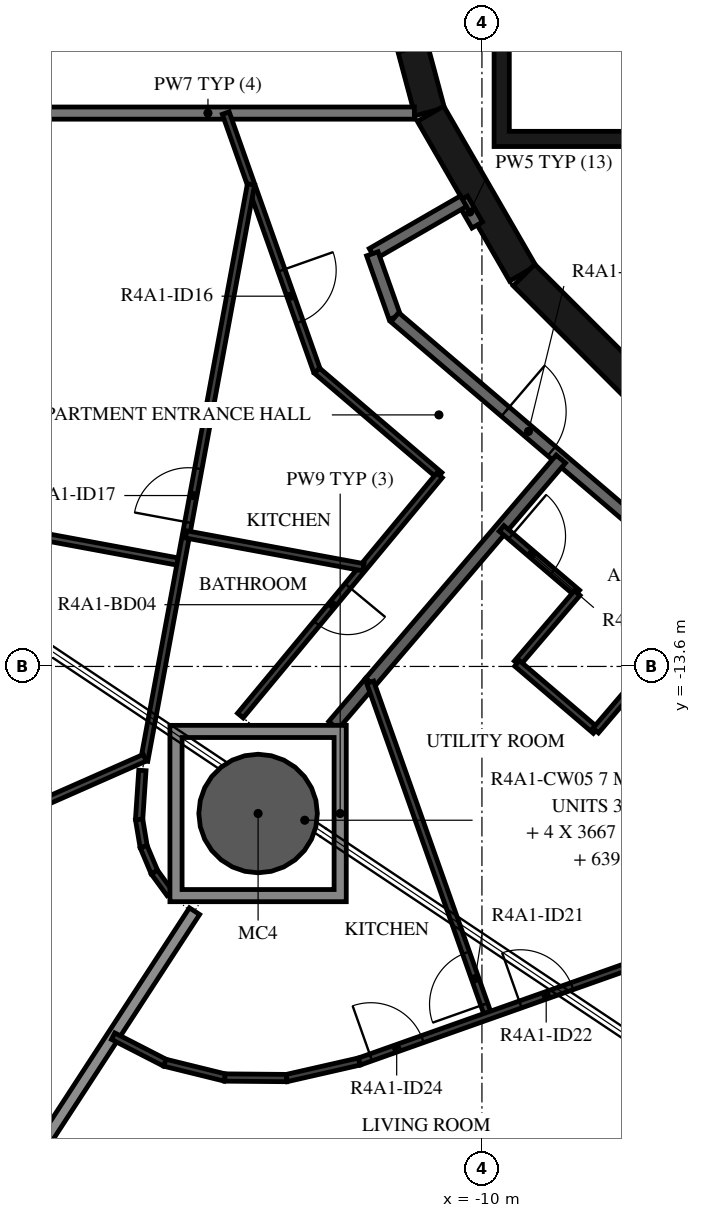
"""IFC4 building model, lengths in metres.
Left out: names, types, materials, properties, quantities, classifications, styles, units other than length and angle.
Written with IfcOpenShell. Run it as: python <this file> out.ifc"""

import sys

from ifc_helpers import new_model, si_unit, direction, frame, frame_2d, origin, origin_2d, place, context, subcontext, project, spatial, polyline, rectangle, hollow_circle, outline, extrude, element, fill, save


model = new_model("IFC4")
c1 = context("Model", 3, precision=1e-05, world=origin(), true_north=direction((0.0, 1.0)))
c2 = subcontext(c1, "Body", "Model", "MODEL_VIEW")
j1 = project(units=[si_unit("LENGTHUNIT", "METRE"), si_unit("PLANEANGLEUNIT", "RADIAN")], contexts=[c1])
p1 = place(None, origin())
s1 = spatial("IfcSite", under=j1, at=p1, CompositionType="ELEMENT")
p2 = place(p1, origin())
s2 = spatial("IfcBuilding", under=s1, at=p2, CompositionType="ELEMENT")
p3 = place(p2, frame((0.0, 0.0, 155.2)))
s3 = spatial("IfcBuildingStorey", under=s2, at=p3, CompositionType="ELEMENT", Elevation=155.2)
p4 = place(p3, frame((-13.681, -16.019, -0.38), z_axis=(0.0, 0.0, 1.0), x_axis=(1.0, 0.0, 0.0)))
e1 = element("IfcColumn", 1, at=p4, inside=s3, PredefinedType="COLUMN", context=c2, shape_type="SweptSolid", body=[
    extrude(hollow_circle(Radius=0.975, WallThickness=0.045, at=origin_2d()), origin(), (0.0, 0.0, 1.0), 3.5),
])
p5 = place(p3, frame((-11.643, -1.55, 0.0), z_axis=(0.0, 0.0, 1.0), x_axis=(0.258734743916, -0.965948410781, 0.0)))
e2 = element("IfcWall", 2, at=p5, inside=s3, PredefinedType="SHEAR", context=c2, shape_type="SweptSolid", body=[
    extrude(rectangle(XDim=3.033, YDim=0.5, at=frame_2d((1.516, 0.0))), origin(), (0.0, 0.0, 1.0), 3.12),
])
p6 = place(p5, frame((1.066, 0.0, 0.0)))
e3 = element("IfcOpeningElement", 3, at=p6, cuts=e2, PredefinedType="OPENING", context=c2, shape_type="SweptSolid", body=[
    extrude(rectangle(XDim=0.9, YDim=2.1, at=frame_2d((0.45, 1.05))), frame((0.0, 0.26, 0.0), z_axis=(0.0, -1.0, 0.0), x_axis=(1.0, 0.0, 0.0)), (0.0, 0.0, 1.0), 0.52),
])
p7 = place(p3, frame((-10.845, -4.51, 0.0), z_axis=(0.0, 0.0, 1.0), x_axis=(0.500087131594, -0.865975092491, 0.0)))
e4 = element("IfcWall", 4, at=p7, inside=s3, PredefinedType="SHEAR", context=c2, shape_type="SweptSolid", body=[
    extrude(rectangle(XDim=3.033, YDim=0.5, at=frame_2d((1.516, 0.0))), origin(), (0.0, 0.0, 1.0), 3.12),
])
p8 = place(p3, frame((-9.308, -7.164, 0.0), z_axis=(0.0, 0.0, 1.0), x_axis=(0.707106781187, -0.707106781187, 0.0)))
e5 = element("IfcWall", 5, at=p8, inside=s3, PredefinedType="SHEAR", context=c2, shape_type="SweptSolid", body=[
    extrude(rectangle(XDim=3.032, YDim=0.5, at=frame_2d((1.516, 0.0))), origin(), (0.0, 0.0, 1.0), 3.12),
])
p9 = place(p3, origin())
e6 = element("IfcWall", 6, at=p9, inside=s3, PredefinedType="SHEAR", context=c2, shape_type="SweptSolid", body=[
    extrude(outline(polyline([(9.8, -5.05), (9.8, -4.8), (9.8, -1.9), (9.55, -1.9), (9.55, -4.8), (7.65, -4.8), (7.65, -1.9), (7.4, -1.9), (7.4, -4.8), (5.5, -4.8), (5.5, -1.9), (5.25, -1.9), (5.25, -4.8), (3.35, -4.8), (3.35, -1.9), (3.1, -1.9), (3.1, -4.8), (1.2, -4.8), (1.2, -1.9), (0.95, -1.9), (0.95, -4.8), (-0.95, -4.8), (-0.95, -1.9), (-1.2, -1.9), (-1.2, -4.8), (-3.1, -4.8), (-3.1, -1.9), (-3.35, -1.9), (-3.35, -4.8), (-5.25, -4.8), (-5.25, -1.9), (-5.5, -1.9), (-5.5, -4.8), (-7.4, -4.8), (-7.4, -1.9), (-7.65, -1.9), (-7.65, -4.8), (-9.55, -4.8), (-9.55, -1.9), (-9.8, -1.9), (-9.8, -4.8), (-9.8, -5.05), (9.8, -5.05)])), origin(), (0.0, 0.0, 1.0), 3.12),
])
p10 = place(p3, frame((-10.323, -5.914, 0.0), z_axis=(0.0, 0.0, 1.0), x_axis=(0.500137201729, -0.865946175837, 0.0)))
e7 = element("IfcWall", 7, at=p10, inside=s3, PredefinedType="STANDARD", context=c2, shape_type="SweptSolid", body=[
    extrude(rectangle(XDim=0.492, YDim=0.2, at=frame_2d((0.246, 0.0))), origin(), (0.0, 0.0, 1.0), 3.12),
])
p11 = place(p3, frame((-10.303, -5.949, 0.0), z_axis=(0.0, 0.0, 1.0), x_axis=(-0.866021168401, -0.500007335828, 0.0)))
e8 = element("IfcWall", 8, at=p11, inside=s3, PredefinedType="STANDARD", context=c2, shape_type="SweptSolid", body=[
    extrude(rectangle(XDim=1.731, YDim=0.2, at=frame_2d((0.865, 0.0))), origin(), (0.0, 0.0, 1.0), 3.12),
])
p12 = place(p3, frame((-11.802, -6.814, 0.0), z_axis=(0.0, 0.0, 1.0), x_axis=(0.333904297771, -0.942606980629, 0.0)))
e9 = element("IfcWall", 9, at=p12, inside=s3, PredefinedType="STANDARD", context=c2, shape_type="SweptSolid", body=[
    extrude(rectangle(XDim=1.107, YDim=0.2, at=frame_2d((0.553, 0.0))), origin(), (0.0, 0.0, 1.0), 3.12),
])
p13 = place(p3, frame((-11.433, -7.858, 0.0), z_axis=(0.0, 0.0, 1.0), x_axis=(0.760412154545, -0.649440801937, 0.0)))
e10 = element("IfcWall", 10, at=p13, inside=s3, PredefinedType="STANDARD", context=c2, shape_type="SweptSolid", body=[
    extrude(rectangle(XDim=7.181, YDim=0.2, at=frame_2d((3.59, 0.0))), origin(), (0.0, 0.0, 1.0), 3.12),
])
p14 = place(p13, frame((2.39, 0.0, 0.0)))
e11 = element("IfcOpeningElement", 11, at=p14, cuts=e10, PredefinedType="OPENING", context=c2, shape_type="SweptSolid", body=[
    extrude(rectangle(XDim=1.0, YDim=2.1, at=frame_2d((0.5, 1.05))), frame((0.0, 0.11, 0.0), z_axis=(0.0, -1.0, 0.0), x_axis=(1.0, 0.0, 0.0)), (0.0, 0.0, 1.0), 0.22),
])
p15 = place(p3, frame((-17.9, -4.5, 0.0), z_axis=(0.0, 0.0, 1.0), x_axis=(1.0, 0.0, 0.0)))
e12 = element("IfcWall", 12, at=p15, inside=s3, PredefinedType="STANDARD", context=c2, shape_type="SweptSolid", body=[
    extrude(rectangle(XDim=6.789, YDim=0.2, at=frame_2d((3.394, 0.0))), origin(), (0.0, 0.0, 1.0), 3.12),
])
p16 = place(p3, frame((-11.838, -13.86, 0.0), z_axis=(0.0, 0.0, 1.0), x_axis=(0.64944503311, 0.760408540831, 0.0)))
e13 = element("IfcWall", 13, at=p16, inside=s3, PredefinedType="STANDARD", context=c2, shape_type="SweptSolid", body=[
    extrude(rectangle(XDim=4.827, YDim=0.2, at=frame_2d((2.414, 0.0))), origin(), (0.0, 0.0, 1.0), 3.12),
])
p17 = place(p3, frame((-12.443, -14.569, 0.0), z_axis=(0.0, 0.0, 1.0), x_axis=(0.649517408851, 0.760346720648, 0.0)))
e14 = element("IfcWall", 14, at=p17, inside=s3, PredefinedType="STANDARD", context=c2, shape_type="SweptSolid", body=[
    extrude(rectangle(XDim=0.932, YDim=0.2, at=frame_2d((0.466, 0.0))), origin(), (0.0, 0.0, 1.0), 3.12),
])
p18 = place(p3, frame((-18.04, -22.713, 0.0), z_axis=(0.0, 0.0, 1.0), x_axis=(0.545629831617, 0.83802630439, 0.0)))
e15 = element("IfcWall", 15, at=p18, inside=s3, PredefinedType="STANDARD", context=c2, shape_type="SweptSolid", body=[
    extrude(rectangle(XDim=6.072, YDim=0.2, at=frame_2d((3.036, 0.0))), origin(), (0.0, 0.0, 1.0), 2.73),
])
p19 = place(p3, frame((-14.213, -4.5, 0.0), z_axis=(0.0, 0.0, 1.0), x_axis=(0.333802904542, -0.942642891513, 0.0)))
e16 = element("IfcWall", 16, at=p19, inside=s3, PredefinedType="PARTITIONING", context=c2, shape_type="SweptSolid", body=[
    extrude(rectangle(XDim=4.495, YDim=0.12, at=frame_2d((2.248, 0.0))), origin(), (0.0, 0.0, 1.0), 3.12),
])
p20 = place(p19, frame((2.744, 0.0, 0.0)))
e17 = element("IfcOpeningElement", 17, at=p20, cuts=e16, PredefinedType="OPENING", context=c2, shape_type="SweptSolid", body=[
    extrude(rectangle(XDim=0.9, YDim=2.1, at=frame_2d((0.45, 1.05))), frame((0.0, 0.07, 0.0), z_axis=(0.0, -1.0, 0.0), x_axis=(1.0, 0.0, 0.0)), (0.0, 0.0, 1.0), 0.14),
])
p21 = place(p3, frame((-12.713, -8.737, 0.0), z_axis=(0.0, 0.0, 1.0), x_axis=(0.760400223405, -0.649454771517, 0.0)))
e18 = element("IfcWall", 18, at=p21, inside=s3, PredefinedType="PARTITIONING", context=c2, shape_type="SweptSolid", body=[
    extrude(rectangle(XDim=2.649, YDim=0.12, at=frame_2d((1.325, 0.0))), origin(), (0.0, 0.0, 1.0), 3.12),
])
p22 = place(p3, frame((-10.698, -10.458, 0.0), z_axis=(0.0, 0.0, 1.0), x_axis=(-0.63830561059, -0.769783052223, 0.0)))
e19 = element("IfcWall", 19, at=p22, inside=s3, PredefinedType="PARTITIONING", context=c2, shape_type="SweptSolid", body=[
    extrude(rectangle(XDim=5.131, YDim=0.12, at=frame_2d((2.565, 0.0))), origin(), (0.0, 0.0, 1.0), 3.12),
])
p23 = place(p22, frame((2.363, 0.0, 0.0)))
e20 = element("IfcOpeningElement", 20, at=p23, cuts=e19, PredefinedType="OPENING", context=c2, shape_type="SweptSolid", body=[
    extrude(rectangle(XDim=0.8, YDim=2.1, at=frame_2d((0.4, 1.05))), frame((0.0, 0.07, 0.0), z_axis=(0.0, -1.0, 0.0), x_axis=(1.0, 0.0, 0.0)), (0.0, 0.0, 1.0), 0.14),
])
p24 = place(p3, frame((-20.849, -10.792, 0.0), z_axis=(0.0, 0.0, 1.0), x_axis=(0.983251500113, -0.182253909494, 0.0)))
e21 = element("IfcWall", 21, at=p24, inside=s3, PredefinedType="PARTITIONING", context=c2, shape_type="SweptSolid", body=[
    extrude(rectangle(XDim=6.0, YDim=0.12, at=frame_2d((3.0, 0.0))), origin(), (0.0, 0.0, 1.0), 2.73),
])
p25 = place(p24, frame((0.2, 0.0, 0.0)))
e22 = element("IfcOpeningElement", 22, at=p25, cuts=e21, PredefinedType="OPENING", context=c2, shape_type="SweptSolid", body=[
    extrude(rectangle(XDim=0.9, YDim=2.1, at=frame_2d((0.45, 1.05))), frame((0.0, 0.07, 0.0), z_axis=(0.0, -1.0, 0.0), x_axis=(1.0, 0.0, 0.0)), (0.0, 0.0, 1.0), 0.14),
])
p26 = place(p3, frame((-15.554, -15.149, 0.0), z_axis=(0.0, 0.0, 1.0), x_axis=(0.182237116667, 0.983254612656, 0.0)))
e23 = element("IfcWall", 23, at=p26, inside=s3, PredefinedType="PARTITIONING", context=c2, shape_type="SweptSolid", body=[
    extrude(rectangle(XDim=9.638, YDim=0.12, at=frame_2d((4.819, 0.0))), origin(), (0.0, 0.0, 1.0), 3.12),
])
p27 = place(p26, frame((3.984, 0.0, 0.0)))
e24 = element("IfcOpeningElement", 24, at=p27, cuts=e23, PredefinedType="OPENING", context=c2, shape_type="SweptSolid", body=[
    extrude(rectangle(XDim=0.9, YDim=2.1, at=frame_2d((0.45, 1.05))), frame((0.0, 0.07, 0.0), z_axis=(0.0, -1.0, 0.0), x_axis=(1.0, 0.0, 0.0)), (0.0, 0.0, 1.0), 0.14),
])
p28 = place(p3, frame((-21.455, -17.71, 0.0), z_axis=(0.0, 0.0, 1.0), x_axis=(0.914829518237, 0.403840256243, 0.0)))
e25 = element("IfcWall", 25, at=p28, inside=s3, PredefinedType="PARTITIONING", context=c2, shape_type="SweptSolid", body=[
    extrude(rectangle(XDim=6.459, YDim=0.12, at=frame_2d((3.23, 0.0))), origin(), (0.0, 0.0, 1.0), 2.73),
])
p29 = place(p28, frame((0.2, 0.0, 0.0)))
e26 = element("IfcOpeningElement", 26, at=p29, cuts=e25, PredefinedType="OPENING", context=c2, shape_type="SweptSolid", body=[
    extrude(rectangle(XDim=0.9, YDim=2.1, at=frame_2d((0.45, 1.05))), frame((0.0, 0.07, 0.0), z_axis=(0.0, -1.0, 0.0), x_axis=(1.0, 0.0, 0.0)), (0.0, 0.0, 1.0), 0.14),
])
p30 = place(p3, frame((-14.865, -11.428, 0.0), z_axis=(0.0, 0.0, 1.0), x_axis=(0.983255224962, -0.182233812955, 0.0)))
e27 = element("IfcWall", 27, at=p30, inside=s3, PredefinedType="PARTITIONING", context=c2, shape_type="SweptSolid", body=[
    extrude(rectangle(XDim=2.963, YDim=0.12, at=frame_2d((1.482, 0.0))), origin(), (0.0, 0.0, 1.0), 3.12),
])
p31 = place(p3, frame((-15.584, -15.311, 0.0), z_axis=(0.0, 0.0, 1.0), x_axis=(-0.066880551605, -0.997760989324, 0.0)))
e28 = element("IfcWall", 28, at=p31, inside=s3, PredefinedType="PARTITIONING", context=c2, shape_type="SweptSolid", body=[
    extrude(rectangle(XDim=0.807, YDim=0.12, at=frame_2d((0.403, 0.0))), origin(), (0.0, 0.0, 1.0), 3.12),
])
for number, where, z_axis, x_axis in (
    (29, (-15.638, -16.115, 0.0), (0.0, 0.0, 1.0), (0.165, -0.986, 0.0)),
    (30, (-15.563, -16.564, 0.0), (0.0, 0.0, 1.0), (0.389, -0.921, 0.0)),
):
    element("IfcWall", number, at=place(p3, frame(where, z_axis=z_axis, x_axis=x_axis)), inside=s3, PredefinedType="PARTITIONING", context=c2, shape_type="SweptSolid", body=[
        extrude(rectangle(XDim=0.455, YDim=0.12, at=frame_2d((0.228, 0.0))), origin(), (0.0, 0.0, 1.0), 3.12),
    ])
p32 = place(p3, frame((-15.386, -16.983, 0.0), z_axis=(0.0, 0.0, 1.0), x_axis=(0.590016589342, -0.807391122258, 0.0)))
e31 = element("IfcWall", 31, at=p32, inside=s3, PredefinedType="PARTITIONING", context=c2, shape_type="SweptSolid", body=[
    extrude(rectangle(XDim=0.432, YDim=0.12, at=frame_2d((0.216, 0.0))), origin(), (0.0, 0.0, 1.0), 3.12),
])
p33 = place(p3, frame((-9.677, -11.33, 0.0), z_axis=(0.0, 0.0, 1.0), x_axis=(0.760372142735, -0.649487647729, 0.0)))
e32 = element("IfcWall", 32, at=p33, inside=s3, PredefinedType="PARTITIONING", context=c2, shape_type="SweptSolid", body=[
    extrude(rectangle(XDim=1.636, YDim=0.12, at=frame_2d((0.818, 0.0))), origin(), (0.0, 0.0, 1.0), 3.12),
])
p34 = place(p33, frame((0.2, 0.0, 0.0)))
e33 = element("IfcOpeningElement", 33, at=p34, cuts=e32, PredefinedType="OPENING", context=c2, shape_type="SweptSolid", body=[
    extrude(rectangle(XDim=0.9, YDim=2.1, at=frame_2d((0.45, 1.05))), frame((0.0, 0.07, 0.0), z_axis=(0.0, -1.0, 0.0), x_axis=(1.0, 0.0, 0.0)), (0.0, 0.0, 1.0), 0.14),
])
p35 = place(p3, frame((-8.433, -12.393, 0.0), z_axis=(0.0, 0.0, 1.0), x_axis=(-0.649443355674, -0.760409973482, 0.0)))
e34 = element("IfcWall", 34, at=p35, inside=s3, PredefinedType="PARTITIONING", context=c2, shape_type="SweptSolid", body=[
    extrude(rectangle(XDim=1.522, YDim=0.12, at=frame_2d((0.761, 0.0))), origin(), (0.0, 0.0, 1.0), 3.12),
])
p36 = place(p3, frame((-9.422, -13.55, 0.0), z_axis=(0.0, 0.0, 1.0), x_axis=(0.760431300628, -0.649418383652, 0.0)))
e35 = element("IfcWall", 35, at=p36, inside=s3, PredefinedType="PARTITIONING", context=c2, shape_type="SweptSolid", body=[
    extrude(rectangle(XDim=1.7, YDim=0.12, at=frame_2d((0.85, 0.0))), origin(), (0.0, 0.0, 1.0), 3.12),
])
p37 = place(p3, frame((-8.129, -14.654, 0.0), z_axis=(0.0, 0.0, 1.0), x_axis=(0.649443355674, 0.760409973482, 0.0)))
e36 = element("IfcWall", 36, at=p37, inside=s3, PredefinedType="PARTITIONING", context=c2, shape_type="SweptSolid", body=[
    extrude(rectangle(XDim=1.522, YDim=0.12, at=frame_2d((0.761, 0.0))), origin(), (0.0, 0.0, 1.0), 3.12),
])
p38 = place(p3, frame((-9.895, -19.346, 0.0), z_axis=(0.0, 0.0, 1.0), x_axis=(-0.333781129158, 0.942650602195, 0.0)))
e37 = element("IfcWall", 37, at=p38, inside=s3, PredefinedType="PARTITIONING", context=c2, shape_type="SweptSolid", body=[
    extrude(rectangle(XDim=5.819, YDim=0.12, at=frame_2d((2.91, 0.0))), origin(), (0.0, 0.0, 1.0), 3.12),
])
p39 = place(p38, frame((0.2, 0.0, 0.0)))
e38 = element("IfcOpeningElement", 38, at=p39, cuts=e37, PredefinedType="OPENING", context=c2, shape_type="SweptSolid", body=[
    extrude(rectangle(XDim=0.9, YDim=2.1, at=frame_2d((0.45, 1.05))), frame((0.0, 0.07, 0.0), z_axis=(0.0, -1.0, 0.0), x_axis=(1.0, 0.0, 0.0)), (0.0, 0.0, 1.0), 0.14),
])
p40 = place(p3, frame((-16.065, -19.68, 0.0), z_axis=(0.0, 0.0, 1.0), x_axis=(0.889684645268, -0.456575549033, 0.0)))
e39 = element("IfcWall", 39, at=p40, inside=s3, PredefinedType="PARTITIONING", context=c2, shape_type="SweptSolid", body=[
    extrude(rectangle(XDim=0.957, YDim=0.12, at=frame_2d((0.479, 0.0))), origin(), (0.0, 0.0, 1.0), 3.12),
])
p41 = place(p3, frame((-15.214, -20.117, 0.0), z_axis=(0.0, 0.0, 1.0), x_axis=(0.970998575146, -0.239085271534, 0.0)))
e40 = element("IfcWall", 40, at=p41, inside=s3, PredefinedType="PARTITIONING", context=c2, shape_type="SweptSolid", body=[
    extrude(rectangle(XDim=1.016, YDim=0.12, at=frame_2d((0.508, 0.0))), origin(), (0.0, 0.0, 1.0), 3.12),
])
p42 = place(p3, frame((-14.227, -20.36, 0.0), z_axis=(0.0, 0.0, 1.0), x_axis=(0.999960467683, -0.008891741722, 0.0)))
e41 = element("IfcWall", 41, at=p42, inside=s3, PredefinedType="PARTITIONING", context=c2, shape_type="SweptSolid", body=[
    extrude(rectangle(XDim=1.016, YDim=0.12, at=frame_2d((0.508, 0.0))), origin(), (0.0, 0.0, 1.0), 3.12),
])
p43 = place(p3, frame((-13.211, -20.369, 0.0), z_axis=(0.0, 0.0, 1.0), x_axis=(0.974997834831, 0.222214360642, 0.0)))
e42 = element("IfcWall", 42, at=p43, inside=s3, PredefinedType="PARTITIONING", context=c2, shape_type="SweptSolid", body=[
    extrude(rectangle(XDim=1.227, YDim=0.12, at=frame_2d((0.614, 0.0))), origin(), (0.0, 0.0, 1.0), 3.12),
])
p44 = place(p3, frame((-12.015, -20.096, 0.0), z_axis=(0.0, 0.0, 1.0), x_axis=(0.942638718556, 0.333814688531, 0.0)))
e43 = element("IfcWall", 43, at=p44, inside=s3, PredefinedType="PARTITIONING", context=c2, shape_type="SweptSolid", body=[
    extrude(rectangle(XDim=8.216, YDim=0.12, at=frame_2d((4.108, 0.0))), origin(), (0.0, 0.0, 1.0), 3.12),
])
p45 = place(p44, frame((2.809, 0.0, 0.0)))
e44 = element("IfcOpeningElement", 44, at=p45, cuts=e43, PredefinedType="OPENING", context=c2, shape_type="SweptSolid", body=[
    extrude(rectangle(XDim=0.9, YDim=2.1, at=frame_2d((0.45, 1.05))), frame((0.0, 0.07, 0.0), z_axis=(0.0, -1.0, 0.0), x_axis=(1.0, 0.0, 0.0)), (0.0, 0.0, 1.0), 0.14),
])
p46 = place(p44, frame((0.2, 0.0, 0.0)))
e45 = element("IfcOpeningElement", 45, at=p46, cuts=e43, PredefinedType="OPENING", context=c2, shape_type="SweptSolid", body=[
    extrude(rectangle(XDim=0.9, YDim=2.1, at=frame_2d((0.45, 1.05))), frame((0.0, 0.07, 0.0), z_axis=(0.0, -1.0, 0.0), x_axis=(1.0, 0.0, 0.0)), (0.0, 0.0, 1.0), 0.14),
])
p47 = place(p3, origin())
e46 = element("IfcWall", 46, at=p47, inside=s3, PredefinedType="STANDARD", context=c2, shape_type="SweptSolid", body=[
    extrude(outline(polyline([(-12.231, -14.569), (-12.231, -17.469), (-15.131, -17.469), (-15.131, -14.569), (-12.231, -14.569)]), holes=[polyline([(-14.931, -17.269), (-12.431, -17.269), (-12.431, -14.769), (-14.931, -14.769), (-14.931, -17.269)])]), origin(), (0.0, 0.0, 1.0), 3.12),
])
p48 = place(p14, origin())
e47 = element("IfcDoor", 47, at=p48, inside=s3, OperationType="SINGLE_SWING_RIGHT", PredefinedType="DOOR", context=c2, shape_type="SweptSolid", body=[
    extrude(rectangle(XDim=1.0, YDim=2.1, at=frame_2d((0.5, 1.05))), frame((0.0, 0.025, 0.0), z_axis=(0.0, -1.0, 0.0), x_axis=(1.0, 0.0, 0.0)), (0.0, 0.0, 1.0), 0.05),
])
fill(e11, e47)
p49 = place(p20, origin())
e48 = element("IfcDoor", 48, at=p49, inside=s3, OperationType="SINGLE_SWING_RIGHT", PredefinedType="DOOR", context=c2, shape_type="SweptSolid", body=[
    extrude(rectangle(XDim=0.9, YDim=2.1, at=frame_2d((0.45, 1.05))), frame((0.0, 0.025, 0.0), z_axis=(0.0, -1.0, 0.0), x_axis=(1.0, 0.0, 0.0)), (0.0, 0.0, 1.0), 0.05),
])
fill(e17, e48)
p50 = place(p23, origin())
e49 = element("IfcDoor", 49, at=p50, inside=s3, OperationType="SINGLE_SWING_RIGHT", PredefinedType="DOOR", context=c2, shape_type="SweptSolid", body=[
    extrude(rectangle(XDim=0.8, YDim=2.1, at=frame_2d((0.4, 1.05))), frame((0.0, 0.025, 0.0), z_axis=(0.0, -1.0, 0.0), x_axis=(1.0, 0.0, 0.0)), (0.0, 0.0, 1.0), 0.05),
])
fill(e20, e49)
p51 = place(p27, origin())
e50 = element("IfcDoor", 50, at=p51, inside=s3, OperationType="SINGLE_SWING_RIGHT", PredefinedType="DOOR", context=c2, shape_type="SweptSolid", body=[
    extrude(rectangle(XDim=0.9, YDim=2.1, at=frame_2d((0.45, 1.05))), frame((0.0, 0.025, 0.0), z_axis=(0.0, -1.0, 0.0), x_axis=(1.0, 0.0, 0.0)), (0.0, 0.0, 1.0), 0.05),
])
fill(e24, e50)
p52 = place(p34, origin())
e51 = element("IfcDoor", 51, at=p52, inside=s3, OperationType="SINGLE_SWING_LEFT", PredefinedType="DOOR", context=c2, shape_type="SweptSolid", body=[
    extrude(rectangle(XDim=0.9, YDim=2.1, at=frame_2d((0.45, 1.05))), frame((0.0, 0.025, 0.0), z_axis=(0.0, -1.0, 0.0), x_axis=(1.0, 0.0, 0.0)), (0.0, 0.0, 1.0), 0.05),
])
fill(e33, e51)
p53 = place(p39, origin())
e52 = element("IfcDoor", 52, at=p53, inside=s3, OperationType="SINGLE_SWING_LEFT", PredefinedType="DOOR", context=c2, shape_type="SweptSolid", body=[
    extrude(rectangle(XDim=0.9, YDim=2.1, at=frame_2d((0.45, 1.05))), frame((0.0, 0.025, 0.0), z_axis=(0.0, -1.0, 0.0), x_axis=(1.0, 0.0, 0.0)), (0.0, 0.0, 1.0), 0.05),
])
fill(e38, e52)
p54 = place(p45, origin())
e53 = element("IfcDoor", 53, at=p54, inside=s3, OperationType="SINGLE_SWING_LEFT", PredefinedType="DOOR", context=c2, shape_type="SweptSolid", body=[
    extrude(rectangle(XDim=0.9, YDim=2.1, at=frame_2d((0.45, 1.05))), frame((0.0, 0.025, 0.0), z_axis=(0.0, -1.0, 0.0), x_axis=(1.0, 0.0, 0.0)), (0.0, 0.0, 1.0), 0.05),
])
fill(e44, e53)
p55 = place(p46, origin())
e54 = element("IfcDoor", 54, at=p55, inside=s3, OperationType="SINGLE_SWING_LEFT", PredefinedType="DOOR", context=c2, shape_type="SweptSolid", body=[
    extrude(rectangle(XDim=0.9, YDim=2.1, at=frame_2d((0.45, 1.05))), frame((0.0, 0.025, 0.0), z_axis=(0.0, -1.0, 0.0), x_axis=(1.0, 0.0, 0.0)), (0.0, 0.0, 1.0), 0.05),
])
fill(e45, e54)
save(model, sys.argv[1])
